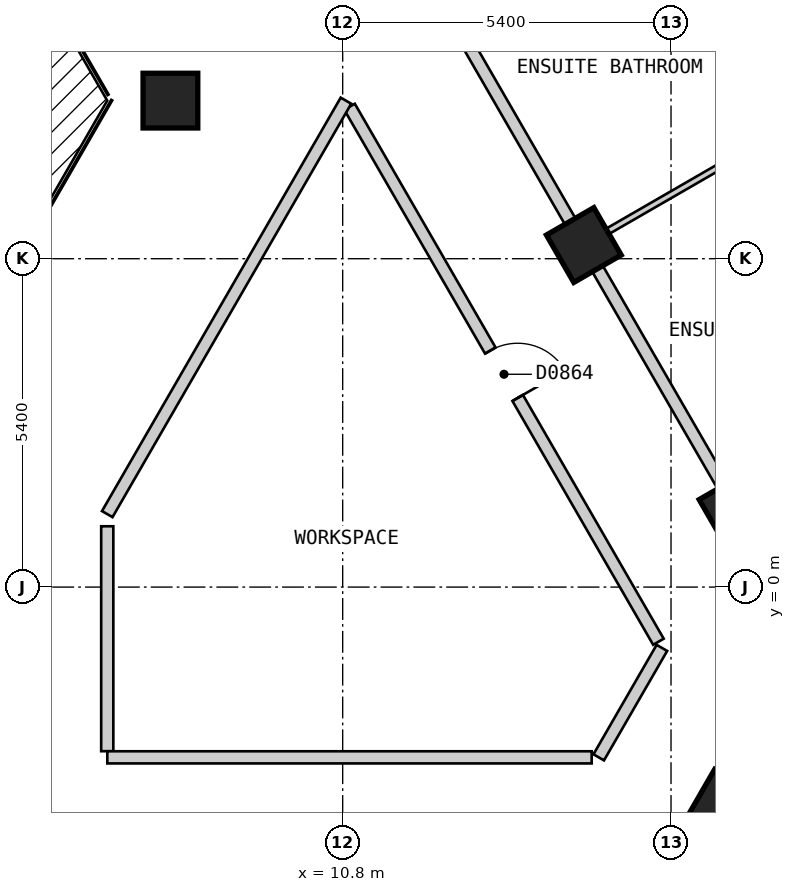
"""IFC4 building model, lengths in metres.
Left out: names, types, materials, properties, quantities, classifications, styles, units other than length and angle.
Written with IfcOpenShell. Run it as: python <this file> out.ifc"""

import sys

from ifc_helpers import new_model, si_unit, direction, frame, frame_2d, origin, origin_2d, place, context, subcontext, project, spatial, polyline, rectangle, outline, extrude, element, fill, save


model = new_model("IFC4")
c1 = context("Model", 3, precision=1e-05, world=origin(), true_north=direction((0.0, 1.0)))
c2 = subcontext(c1, "Body", "Model", "MODEL_VIEW")
j1 = project(units=[si_unit("LENGTHUNIT", "METRE"), si_unit("PLANEANGLEUNIT", "RADIAN")], contexts=[c1])
p1 = place(None, origin())
s1 = spatial("IfcSite", under=j1, at=p1, CompositionType="ELEMENT")
p2 = place(p1, origin())
s2 = spatial("IfcBuilding", under=s1, at=p2, CompositionType="ELEMENT")
p3 = place(p2, frame((0.0, 0.0, 72.0)))
s3 = spatial("IfcBuildingStorey", under=s2, at=p3, CompositionType="ELEMENT", Elevation=72.0)
for number, where, z_axis, x_axis in (
    (1, (17.083, -3.612, 0.0), (0.0, 0.0, 1.0), (0.5, 0.866, 0.0)),
    (2, (17.278, 1.274, 0.0), (0.0, 0.0, 1.0), (-0.5, 0.866, 0.0)),
    (3, (14.766, 5.625, 0.0), (0.0, 0.0, 1.0), (-0.5, 0.866, 0.0)),
    (4, (7.967, 8.0, 0.0), (0.0, 0.0, 1.0), (1.0, 0.0, 0.0)),
):
    element("IfcColumn", number, at=place(p3, frame(where, z_axis=z_axis, x_axis=x_axis)), inside=s3, PredefinedType="COLUMN", context=c2, shape_type="SweptSolid", body=[
        extrude(rectangle(XDim=0.9, YDim=0.9, at=origin_2d()), origin(), (0.0, 0.0, 1.0), 3.0),
    ])
p4 = place(p3, frame((29.027, 1.425, 0.0), z_axis=(0.0, 0.0, 1.0), x_axis=(-0.500027479704, 0.866009537788, 0.0)))
e5 = element("IfcWall", 5, at=p4, inside=s3, PredefinedType="SOLIDWALL", context=c2, shape_type="SweptSolid", body=[
    extrude(outline(polyline([(0.0, -0.15), (26.559, -0.15), (26.478, 0.15), (0.08, 0.15), (0.0, -0.15)])), origin(), (0.0, 0.0, 1.0), 2.7),
])
p5 = place(p4, frame((2.483, 0.0, 0.15)))
e6 = element("IfcOpeningElement", 6, at=p5, cuts=e5, PredefinedType="OPENING", context=c2, shape_type="SweptSolid", body=[
    extrude(rectangle(XDim=1.5, YDim=2.1, at=frame_2d((0.75, 1.05))), frame((0.0, 0.16, 0.0), z_axis=(0.0, -1.0, 0.0), x_axis=(1.0, 0.0, 0.0)), (0.0, 0.0, 1.0), 0.32),
])
p6 = place(p4, frame((7.506, 0.0, 0.15)))
e7 = element("IfcOpeningElement", 7, at=p6, cuts=e5, PredefinedType="OPENING", context=c2, shape_type="SweptSolid", body=[
    extrude(rectangle(XDim=1.5, YDim=2.1, at=frame_2d((0.75, 1.05))), frame((0.0, 0.16, 0.0), z_axis=(0.0, -1.0, 0.0), x_axis=(1.0, 0.0, 0.0)), (0.0, 0.0, 1.0), 0.32),
])
p7 = place(p4, frame((12.529, 0.0, 0.15)))
e8 = element("IfcOpeningElement", 8, at=p7, cuts=e5, PredefinedType="OPENING", context=c2, shape_type="SweptSolid", body=[
    extrude(rectangle(XDim=1.5, YDim=2.1, at=frame_2d((0.75, 1.05))), frame((0.0, 0.16, 0.0), z_axis=(0.0, -1.0, 0.0), x_axis=(1.0, 0.0, 0.0)), (0.0, 0.0, 1.0), 0.32),
])
p8 = place(p4, frame((17.552, 0.0, 0.15)))
e9 = element("IfcOpeningElement", 9, at=p8, cuts=e5, PredefinedType="OPENING", context=c2, shape_type="SweptSolid", body=[
    extrude(rectangle(XDim=1.5, YDim=2.1, at=frame_2d((0.75, 1.05))), frame((0.0, 0.16, 0.0), z_axis=(0.0, -1.0, 0.0), x_axis=(1.0, 0.0, 0.0)), (0.0, 0.0, 1.0), 0.32),
])
p9 = place(p4, frame((22.575, 0.0, 0.15)))
e10 = element("IfcOpeningElement", 10, at=p9, cuts=e5, PredefinedType="OPENING", context=c2, shape_type="SweptSolid", body=[
    extrude(rectangle(XDim=1.5, YDim=2.1, at=frame_2d((0.75, 1.05))), frame((0.0, 0.16, 0.0), z_axis=(0.0, -1.0, 0.0), x_axis=(1.0, 0.0, 0.0)), (0.0, 0.0, 1.0), 0.32),
])
p10 = place(p3, frame((10.913, 7.899, 0.0), z_axis=(0.0, 0.0, 1.0), x_axis=(0.500028940566, -0.866008694296, 0.0)))
e11 = element("IfcWall", 11, at=p10, inside=s3, PredefinedType="PARTITIONING", context=c2, shape_type="SweptSolid", body=[
    extrude(rectangle(XDim=10.159, YDim=0.2, at=frame_2d((5.08, 0.0))), origin(), (0.0, 0.0, 1.0), 2.7),
])
p11 = place(p10, frame((4.63, 0.0, 0.0)))
e12 = element("IfcOpeningElement", 12, at=p11, cuts=e11, PredefinedType="OPENING", context=c2, shape_type="SweptSolid", body=[
    extrude(rectangle(XDim=0.9, YDim=2.1, at=frame_2d((0.45, 1.05))), frame((0.0, 0.11, 0.0), z_axis=(0.0, -1.0, 0.0), x_axis=(1.0, 0.0, 0.0)), (0.0, 0.0, 1.0), 0.22),
])
p12 = place(p3, frame((8.488, 16.5, 0.0), z_axis=(0.0, 0.0, 1.0), x_axis=(0.499986836607, -0.86603300354, 0.0)))
e13 = element("IfcWall", 13, at=p12, inside=s3, PredefinedType="PARTITIONING", context=c2, shape_type="SweptSolid", body=[
    extrude(rectangle(XDim=20.09, YDim=0.2, at=frame_2d((10.045, 0.0))), origin(), (0.0, 0.0, 1.0), 2.7),
])
p13 = place(p12, frame((4.523, 0.0, 0.0)))
e14 = element("IfcOpeningElement", 14, at=p13, cuts=e13, PredefinedType="OPENING", context=c2, shape_type="SweptSolid", body=[
    extrude(rectangle(XDim=1.0, YDim=2.1, at=frame_2d((0.5, 1.05))), frame((0.0, 0.11, 0.0), z_axis=(0.0, -1.0, 0.0), x_axis=(1.0, 0.0, 0.0)), (0.0, 0.0, 1.0), 0.22),
])
p14 = place(p3, frame((6.928, 1.0, 0.0), z_axis=(0.0, 0.0, 1.0), x_axis=(0.0, -1.0, 0.0)))
e15 = element("IfcWall", 15, at=p14, inside=s3, PredefinedType="PARTITIONING", context=c2, shape_type="SweptSolid", body=[
    extrude(rectangle(XDim=3.699, YDim=0.2, at=frame_2d((1.85, 0.0))), origin(), (0.0, 0.0, 1.0), 2.7),
])
p15 = place(p3, frame((6.929, -2.8, 0.0), z_axis=(0.0, 0.0, 1.0), x_axis=(1.0, 0.0, 0.0)))
e16 = element("IfcWall", 16, at=p15, inside=s3, PredefinedType="PARTITIONING", context=c2, shape_type="SweptSolid", body=[
    extrude(rectangle(XDim=7.966, YDim=0.2, at=frame_2d((3.983, 0.0))), origin(), (0.0, 0.0, 1.0), 2.7),
])
p16 = place(p3, frame((6.928, 1.2, 0.0), z_axis=(0.0, 0.0, 1.0), x_axis=(0.500055327065, 0.865993458332, 0.0)))
e17 = element("IfcWall", 17, at=p16, inside=s3, PredefinedType="PARTITIONING", context=c2, shape_type="SweptSolid", body=[
    extrude(rectangle(XDim=7.851, YDim=0.2, at=frame_2d((3.926, 0.0))), origin(), (0.0, 0.0, 1.0), 2.7),
])
p17 = place(p3, frame((15.011, -2.8, 0.0), z_axis=(0.0, 0.0, 1.0), x_axis=(0.499929208183, 0.866066271601, 0.0)))
e18 = element("IfcWall", 18, at=p17, inside=s3, PredefinedType="PARTITIONING", context=c2, shape_type="SweptSolid", body=[
    extrude(rectangle(XDim=2.078, YDim=0.2, at=frame_2d((1.039, 0.0))), origin(), (0.0, 0.0, 1.0), 2.7),
])
p18 = place(p3, frame((15.771, -5.884, 0.0), z_axis=(0.0, 0.0, 1.0), x_axis=(0.499939494019, 0.866060334111, 0.0)))
e19 = element("IfcWall", 19, at=p18, inside=s3, PredefinedType="PARTITIONING", context=c2, shape_type="SweptSolid", body=[
    extrude(rectangle(XDim=5.583, YDim=0.2, at=frame_2d((2.792, 0.0))), origin(), (0.0, 0.0, 1.0), 2.7),
])
p19 = place(p18, frame((3.647, 0.0, 0.0)))
e20 = element("IfcOpeningElement", 20, at=p19, cuts=e19, PredefinedType="OPENING", context=c2, shape_type="SweptSolid", body=[
    extrude(rectangle(XDim=1.0, YDim=2.1, at=frame_2d((0.5, 1.05))), frame((0.0, 0.11, 0.0), z_axis=(0.0, -1.0, 0.0), x_axis=(1.0, 0.0, 0.0)), (0.0, 0.0, 1.0), 0.22),
])
p20 = place(p3, frame((15.398, 11.731, 0.0), z_axis=(0.0, 0.0, 1.0), x_axis=(0.500010064822, -0.866019592779, 0.0)))
e21 = element("IfcWall", 21, at=p20, inside=s3, PredefinedType="PARTITIONING", context=c2, shape_type="SweptSolid", body=[
    extrude(rectangle(XDim=4.972, YDim=0.1, at=frame_2d((2.486, 0.0))), origin(), (0.0, 0.0, 1.0), 2.7),
])
p21 = place(p20, frame((2.061, 0.0, 0.0)))
e22 = element("IfcOpeningElement", 22, at=p21, cuts=e21, PredefinedType="OPENING", context=c2, shape_type="SweptSolid", body=[
    extrude(rectangle(XDim=0.8, YDim=2.1, at=frame_2d((0.4, 1.05))), frame((0.0, 0.06, 0.0), z_axis=(0.0, -1.0, 0.0), x_axis=(1.0, 0.0, 0.0)), (0.0, 0.0, 1.0), 0.12),
])
p22 = place(p3, frame((14.853, 5.675, 0.0), z_axis=(0.0, 0.0, 1.0), x_axis=(0.866016855193, 0.500014806302, 0.0)))
e23 = element("IfcWall", 23, at=p22, inside=s3, PredefinedType="PARTITIONING", context=c2, shape_type="SweptSolid", body=[
    extrude(rectangle(XDim=10.0, YDim=0.1, at=frame_2d((5.0, 0.0))), origin(), (0.0, 0.0, 1.0), 2.7),
])
p23 = place(p22, frame((6.3, 0.0, 0.0)))
e24 = element("IfcOpeningElement", 24, at=p23, cuts=e23, PredefinedType="OPENING", context=c2, shape_type="SweptSolid", body=[
    extrude(rectangle(XDim=0.9, YDim=2.1, at=frame_2d((0.45, 1.05))), frame((0.0, 0.06, 0.0), z_axis=(0.0, -1.0, 0.0), x_axis=(1.0, 0.0, 0.0)), (0.0, 0.0, 1.0), 0.12),
])
p24 = place(p11, origin())
e25 = element("IfcDoor", 25, at=p24, inside=s3, OperationType="SINGLE_SWING_RIGHT", PredefinedType="DOOR", context=c2, shape_type="SweptSolid", body=[
    extrude(rectangle(XDim=0.9, YDim=2.1, at=frame_2d((0.45, 1.05))), frame((0.0, 0.025, 0.0), z_axis=(0.0, -1.0, 0.0), x_axis=(1.0, 0.0, 0.0)), (0.0, 0.0, 1.0), 0.05),
])
fill(e12, e25)
save(model, sys.argv[1])
